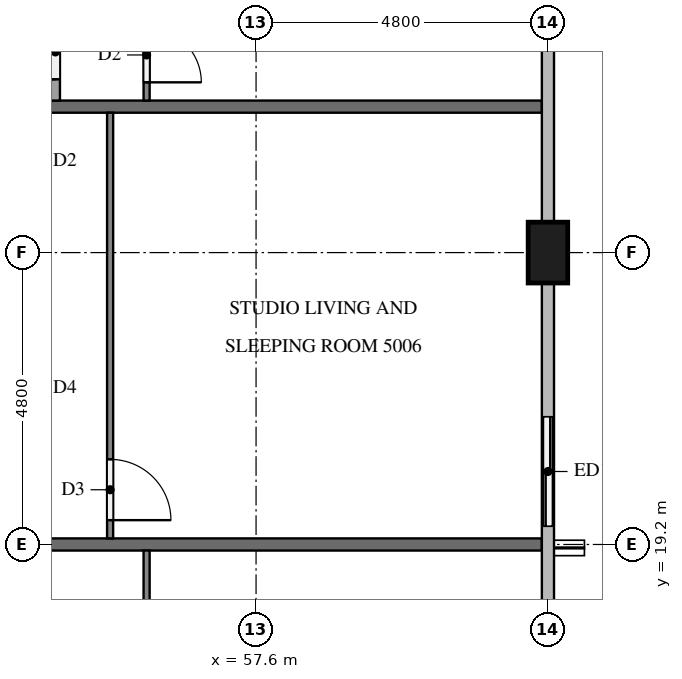
"""IFC4 building model, lengths in metres.
Left out: names, types, materials, properties, quantities, classifications, styles, units other than length and angle.
Written with IfcOpenShell. Run it as: python <this file> out.ifc"""

import sys

from ifc_helpers import new_model, si_unit, direction, frame, frame_2d, origin, origin_2d, place, context, subcontext, project, spatial, rectangle, extrude, element, fill, save


model = new_model("IFC4")
c1 = context("Model", 3, precision=1e-05, world=origin(), true_north=direction((0.0, 1.0)))
c2 = subcontext(c1, "Body", "Model", "MODEL_VIEW")
j1 = project(units=[si_unit("LENGTHUNIT", "METRE"), si_unit("PLANEANGLEUNIT", "RADIAN")], contexts=[c1])
p1 = place(None, origin())
s1 = spatial("IfcSite", under=j1, at=p1, CompositionType="ELEMENT")
p2 = place(p1, origin())
s2 = spatial("IfcBuilding", under=s1, at=p2, CompositionType="ELEMENT")
p3 = place(p2, frame((0.0, 0.0, 192.9)))
s3 = spatial("IfcBuildingStorey", under=s2, at=p3, CompositionType="ELEMENT", Elevation=192.9)
p4 = place(p3, frame((62.4, 24.0, 0.0), z_axis=(0.0, 0.0, 1.0), x_axis=(0.0, 1.0, 0.0)))
e1 = element("IfcColumn", 1, at=p4, inside=s3, PredefinedType="COLUMN", context=c2, shape_type="SweptSolid", body=[
    extrude(rectangle(XDim=1.0, YDim=0.65, at=origin_2d()), origin(), (0.0, 0.0, 1.0), 3.2),
])
p5 = place(p3, frame((62.4, 19.2, 0.0), z_axis=(0.0, 0.0, 1.0), x_axis=(0.0, 1.0, 0.0)))
e2 = element("IfcWall", 2, at=p5, inside=s3, PredefinedType="SOLIDWALL", context=c2, shape_type="SweptSolid", body=[
    extrude(rectangle(XDim=2.4, YDim=0.15, at=frame_2d((1.2, 0.0))), origin(), (0.0, 0.0, 1.0), 3.2),
])
p6 = place(p5, frame((0.3, 0.0, 0.0)))
e3 = element("IfcOpeningElement", 3, at=p6, cuts=e2, PredefinedType="OPENING", context=c2, shape_type="SweptSolid", body=[
    extrude(rectangle(XDim=1.8, YDim=2.4, at=frame_2d((0.9, 1.2))), frame((0.0, 0.085, 0.0), z_axis=(0.0, -1.0, 0.0), x_axis=(1.0, 0.0, 0.0)), (0.0, 0.0, 1.0), 0.17),
])
for number, where, z_axis, x_axis in (
    (4, (50.5, 19.2, 0.0), (0.0, 0.0, 1.0), (1.0, 0.0, 0.0)),
    (5, (50.5, 26.4, 0.0), (0.0, 0.0, 1.0), (1.0, 0.0, 0.0)),
):
    element("IfcWall", number, at=place(p3, frame(where, z_axis=z_axis, x_axis=x_axis)), inside=s3, PredefinedType="PARTITIONING", context=c2, shape_type="SweptSolid", body=[
        extrude(rectangle(XDim=11.8, YDim=0.2, at=frame_2d((5.9, 0.0))), origin(), (0.0, 0.0, 1.0), 3.2),
    ])
p7 = place(p3, frame((55.8, 19.1, 0.0), z_axis=(0.0, 0.0, 1.0), x_axis=(0.0, -1.0, 0.0)))
e6 = element("IfcWall", 6, at=p7, inside=s3, PredefinedType="PARTITIONING", context=c2, shape_type="SweptSolid", body=[
    extrude(rectangle(XDim=7.0, YDim=0.1, at=frame_2d((3.5, 0.0))), origin(), (0.0, 0.0, 1.0), 3.2),
])
p8 = place(p7, frame((5.7, 0.0, 0.0)))
e7 = element("IfcOpeningElement", 7, at=p8, cuts=e6, PredefinedType="OPENING", context=c2, shape_type="SweptSolid", body=[
    extrude(rectangle(XDim=1.0, YDim=2.1, at=frame_2d((0.5, 1.05))), frame((0.0, 0.06, 0.0), z_axis=(0.0, -1.0, 0.0), x_axis=(1.0, 0.0, 0.0)), (0.0, 0.0, 1.0), 0.12),
])
p9 = place(p3, frame((55.2, 26.3, 0.0), z_axis=(0.0, 0.0, 1.0), x_axis=(0.0, -1.0, 0.0)))
e8 = element("IfcWall", 8, at=p9, inside=s3, PredefinedType="PARTITIONING", context=c2, shape_type="SweptSolid", body=[
    extrude(rectangle(XDim=7.0, YDim=0.1, at=frame_2d((3.5, 0.0))), origin(), (0.0, 0.0, 1.0), 3.2),
])
p10 = place(p9, frame((5.7, 0.0, 0.0)))
e9 = element("IfcOpeningElement", 9, at=p10, cuts=e8, PredefinedType="OPENING", context=c2, shape_type="SweptSolid", body=[
    extrude(rectangle(XDim=1.0, YDim=2.1, at=frame_2d((0.5, 1.05))), frame((0.0, 0.06, 0.0), z_axis=(0.0, -1.0, 0.0), x_axis=(1.0, 0.0, 0.0)), (0.0, 0.0, 1.0), 0.12),
])
p11 = place(p3, frame((55.8, 40.7, 0.0), z_axis=(0.0, 0.0, 1.0), x_axis=(0.0, -1.0, 0.0)))
e10 = element("IfcWall", 10, at=p11, inside=s3, PredefinedType="PARTITIONING", context=c2, shape_type="SweptSolid", body=[
    extrude(rectangle(XDim=14.2, YDim=0.1, at=frame_2d((7.1, 0.0))), origin(), (0.0, 0.0, 1.0), 3.2),
])
p12 = place(p11, frame((3.45, 0.0, 0.0)))
e11 = element("IfcOpeningElement", 11, at=p12, cuts=e10, PredefinedType="OPENING", context=c2, shape_type="SweptSolid", body=[
    extrude(rectangle(XDim=0.9, YDim=2.1, at=frame_2d((0.45, 1.05))), frame((0.0, 0.06, 0.0), z_axis=(0.0, -1.0, 0.0), x_axis=(1.0, 0.0, 0.0)), (0.0, 0.0, 1.0), 0.12),
])
p13 = place(p11, frame((5.05, 0.0, 0.0)))
e12 = element("IfcOpeningElement", 12, at=p13, cuts=e10, PredefinedType="OPENING", context=c2, shape_type="SweptSolid", body=[
    extrude(rectangle(XDim=1.0, YDim=2.1, at=frame_2d((0.5, 1.05))), frame((0.0, 0.06, 0.0), z_axis=(0.0, -1.0, 0.0), x_axis=(1.0, 0.0, 0.0)), (0.0, 0.0, 1.0), 0.12),
])
p14 = place(p11, frame((13.0, 0.0, 0.0)))
e13 = element("IfcOpeningElement", 13, at=p14, cuts=e10, PredefinedType="OPENING", context=c2, shape_type="SweptSolid", body=[
    extrude(rectangle(XDim=0.9, YDim=2.1, at=frame_2d((0.45, 1.05))), frame((0.0, 0.06, 0.0), z_axis=(0.0, -1.0, 0.0), x_axis=(1.0, 0.0, 0.0)), (0.0, 0.0, 1.0), 0.12),
])
p15 = place(p3, frame((54.3, 26.5, 0.0), z_axis=(0.0, 0.0, 1.0), x_axis=(0.0, 1.0, 0.0)))
e14 = element("IfcWall", 14, at=p15, inside=s3, PredefinedType="PARTITIONING", context=c2, shape_type="SweptSolid", body=[
    extrude(rectangle(XDim=12.425, YDim=0.15, at=frame_2d((6.212, 0.0))), origin(), (0.0, 0.0, 1.0), 3.2),
])
p16 = place(p15, frame((7.015, 0.0, 0.0)))
e15 = element("IfcOpeningElement", 15, at=p16, cuts=e14, PredefinedType="OPENING", context=c2, shape_type="SweptSolid", body=[
    extrude(rectangle(XDim=0.9, YDim=2.1, at=frame_2d((0.45, 1.05))), frame((0.0, 0.085, 0.0), z_axis=(0.0, -1.0, 0.0), x_axis=(1.0, 0.0, 0.0)), (0.0, 0.0, 1.0), 0.17),
])
p17 = place(p15, frame((5.565, 0.0, 0.0)))
e16 = element("IfcOpeningElement", 16, at=p17, cuts=e14, PredefinedType="OPENING", context=c2, shape_type="SweptSolid", body=[
    extrude(rectangle(XDim=0.8, YDim=2.1, at=frame_2d((0.4, 1.05))), frame((0.0, 0.085, 0.0), z_axis=(0.0, -1.0, 0.0), x_axis=(1.0, 0.0, 0.0)), (0.0, 0.0, 1.0), 0.17),
])
p18 = place(p15, frame((0.35, 0.0, 0.0)))
e17 = element("IfcOpeningElement", 17, at=p18, cuts=e14, PredefinedType="OPENING", context=c2, shape_type="SweptSolid", body=[
    extrude(rectangle(XDim=0.9, YDim=2.1, at=frame_2d((0.45, 1.05))), frame((0.0, 0.085, 0.0), z_axis=(0.0, -1.0, 0.0), x_axis=(1.0, 0.0, 0.0)), (0.0, 0.0, 1.0), 0.17),
])
p19 = place(p6, origin())
e18 = element("IfcDoor", 18, at=p19, inside=s3, OperationType="SLIDING_TO_RIGHT", PredefinedType="DOOR", context=c2, shape_type="SweptSolid", body=[
    extrude(rectangle(XDim=1.8, YDim=2.4, at=frame_2d((0.9, 1.2))), frame((0.0, 0.025, 0.0), z_axis=(0.0, -1.0, 0.0), x_axis=(1.0, 0.0, 0.0)), (0.0, 0.0, 1.0), 0.05),
])
fill(e3, e18)
p20 = place(p10, origin())
e19 = element("IfcDoor", 19, at=p20, inside=s3, OperationType="SINGLE_SWING_RIGHT", PredefinedType="DOOR", context=c2, shape_type="SweptSolid", body=[
    extrude(rectangle(XDim=1.0, YDim=2.1, at=frame_2d((0.5, 1.05))), frame((0.0, 0.025, 0.0), z_axis=(0.0, -1.0, 0.0), x_axis=(1.0, 0.0, 0.0)), (0.0, 0.0, 1.0), 0.05),
])
fill(e9, e19)
p21 = place(p14, origin())
e20 = element("IfcDoor", 20, at=p21, inside=s3, OperationType="SINGLE_SWING_RIGHT", PredefinedType="DOOR", context=c2, shape_type="SweptSolid", body=[
    extrude(rectangle(XDim=0.9, YDim=2.1, at=frame_2d((0.45, 1.05))), frame((0.0, 0.025, 0.0), z_axis=(0.0, -1.0, 0.0), x_axis=(1.0, 0.0, 0.0)), (0.0, 0.0, 1.0), 0.05),
])
fill(e13, e20)
p22 = place(p18, origin())
e21 = element("IfcDoor", 21, at=p22, inside=s3, OperationType="SINGLE_SWING_LEFT", PredefinedType="DOOR", context=c2, shape_type="SweptSolid", body=[
    extrude(rectangle(XDim=0.9, YDim=2.1, at=frame_2d((0.45, 1.05))), frame((0.0, 0.025, 0.0), z_axis=(0.0, -1.0, 0.0), x_axis=(1.0, 0.0, 0.0)), (0.0, 0.0, 1.0), 0.05),
])
fill(e17, e21)
save(model, sys.argv[1])
